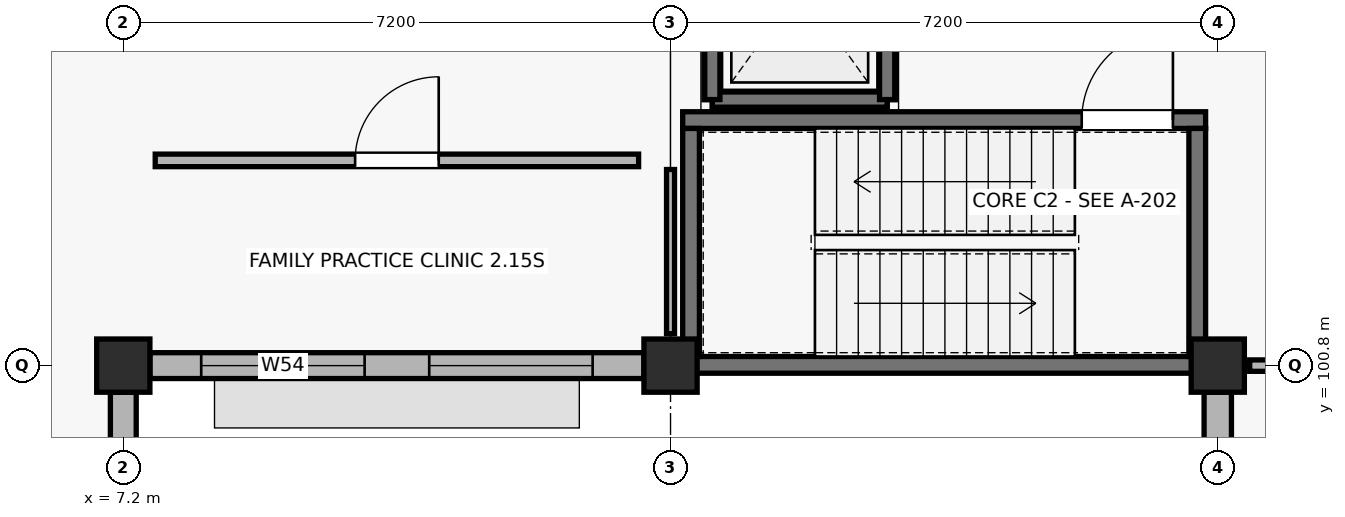
"""IFC4 building model, lengths in metres.
Left out: names, types, materials, properties, quantities, classifications, styles, units other than length and angle.
Written with IfcOpenShell. Run it as: python <this file> out.ifc"""

import sys

from ifc_helpers import new_model, si_unit, direction, frame, frame_2d, origin, origin_2d, place, context, subcontext, project, spatial, rectangle, extrude, element, fill, save


model = new_model("IFC4")
c1 = context("Model", 3, precision=1e-05, world=origin(), true_north=direction((0.0, 1.0)))
c2 = subcontext(c1, "Body", "Model", "MODEL_VIEW")
j1 = project(units=[si_unit("LENGTHUNIT", "METRE"), si_unit("PLANEANGLEUNIT", "RADIAN")], contexts=[c1])
p1 = place(None, origin())
s1 = spatial("IfcSite", under=j1, at=p1, CompositionType="ELEMENT")
p2 = place(p1, origin())
s2 = spatial("IfcBuilding", under=s1, at=p2, CompositionType="ELEMENT")
p3 = place(p2, origin())
s3 = spatial("IfcBuildingStorey", under=s2, at=p3, CompositionType="ELEMENT", Elevation=0.0)
for number, where, z_axis, x_axis in (
    (1, (7.2, 100.8, -0.25), (0.0, 0.0, 1.0), (1.0, 0.0, 0.0)),
    (2, (14.4, 100.8, -0.25), (0.0, 0.0, 1.0), (1.0, 0.0, 0.0)),
    (3, (21.6, 100.8, -0.25), (0.0, 0.0, 1.0), (1.0, 0.0, 0.0)),
):
    element("IfcColumn", number, at=place(p3, frame(where, z_axis=z_axis, x_axis=x_axis)), inside=s3, PredefinedType="COLUMN", context=c2, shape_type="SweptSolid", body=[
        extrude(rectangle(XDim=0.7, YDim=0.7, at=origin_2d()), origin(), (0.0, 0.0, 1.0), 4.75),
    ])
p4 = place(p3, frame((7.2, 93.95, 0.0), z_axis=(0.0, 0.0, 1.0), x_axis=(0.0, 1.0, 0.0)))
e4 = element("IfcWall", 4, at=p4, inside=s3, PredefinedType="SOLIDWALL", context=c2, shape_type="SweptSolid", body=[
    extrude(rectangle(XDim=6.5, YDim=0.34, at=frame_2d((3.25, 0.0))), origin(), (0.0, 0.0, 1.0), 3.52),
])
p5 = place(p3, frame((7.55, 100.8, 0.0), z_axis=(0.0, 0.0, 1.0), x_axis=(1.0, 0.0, 0.0)))
e5 = element("IfcWall", 5, at=p5, inside=s3, PredefinedType="SOLIDWALL", context=c2, shape_type="SweptSolid", body=[
    extrude(rectangle(XDim=6.5, YDim=0.34, at=frame_2d((3.25, 0.0))), origin(), (0.0, 0.0, 1.0), 3.47),
])
p6 = place(p5, frame((0.675, 0.0, 0.9)))
e6 = element("IfcOpeningElement", 6, at=p6, cuts=e5, PredefinedType="OPENING", context=c2, shape_type="SweptSolid", body=[
    extrude(rectangle(XDim=2.15, YDim=1.88, at=frame_2d((1.075, 0.94))), frame((0.0, 0.18, 0.0), z_axis=(0.0, -1.0, 0.0), x_axis=(1.0, 0.0, 0.0)), (0.0, 0.0, 1.0), 0.36),
])
p7 = place(p5, frame((3.675, 0.0, 0.9)))
e7 = element("IfcOpeningElement", 7, at=p7, cuts=e5, PredefinedType="OPENING", context=c2, shape_type="SweptSolid", body=[
    extrude(rectangle(XDim=2.15, YDim=1.88, at=frame_2d((1.075, 0.94))), frame((0.0, 0.18, 0.0), z_axis=(0.0, -1.0, 0.0), x_axis=(1.0, 0.0, 0.0)), (0.0, 0.0, 1.0), 0.36),
])
p8 = place(p3, frame((21.6, 100.45, 0.0), z_axis=(0.0, 0.0, 1.0), x_axis=(0.0, -1.0, 0.0)))
e8 = element("IfcWall", 8, at=p8, inside=s3, PredefinedType="SOLIDWALL", context=c2, shape_type="SweptSolid", body=[
    extrude(rectangle(XDim=6.525, YDim=0.36, at=frame_2d((3.262, 0.0))), origin(), (0.0, 0.0, 1.0), 3.52),
])
p9 = place(p8, frame((1.15, 0.0, 0.9)))
e9 = element("IfcOpeningElement", 9, at=p9, cuts=e8, PredefinedType="OPENING", context=c2, shape_type="SweptSolid", body=[
    extrude(rectangle(XDim=1.2, YDim=1.5, at=frame_2d((0.6, 0.75))), frame((0.0, 0.19, 0.0), z_axis=(0.0, -1.0, 0.0), x_axis=(1.0, 0.0, 0.0)), (0.0, 0.0, 1.0), 0.38),
])
p10 = place(p8, frame((4.175, 0.0, 0.9)))
e10 = element("IfcOpeningElement", 10, at=p10, cuts=e8, PredefinedType="OPENING", context=c2, shape_type="SweptSolid", body=[
    extrude(rectangle(XDim=1.2, YDim=1.5, at=frame_2d((0.6, 0.75))), frame((0.0, 0.19, 0.0), z_axis=(0.0, -1.0, 0.0), x_axis=(1.0, 0.0, 0.0)), (0.0, 0.0, 1.0), 0.38),
])
p11 = place(p3, frame((14.95, 104.3, -0.95), z_axis=(0.0, 0.0, 1.0), x_axis=(1.0, 0.0, 0.0)))
e11 = element("IfcWall", 11, at=p11, inside=s3, PredefinedType="SHEAR", context=c2, shape_type="SweptSolid", body=[
    extrude(rectangle(XDim=2.3, YDim=0.22, at=frame_2d((1.15, 0.0))), origin(), (0.0, 0.0, 1.0), 0.95),
])
for number, where, z_axis, x_axis in (
    (12, (17.25, 104.3, -0.95), (0.0, 0.0, 1.0), (0.0, 1.0, 0.0)),
    (13, (14.95, 107.25, -0.95), (0.0, 0.0, 1.0), (0.0, -1.0, 0.0)),
):
    element("IfcWall", number, at=place(p3, frame(where, z_axis=z_axis, x_axis=x_axis)), inside=s3, PredefinedType="SHEAR", context=c2, shape_type="SweptSolid", body=[
        extrude(rectangle(XDim=2.95, YDim=0.22, at=frame_2d((1.475, 0.0))), origin(), (0.0, 0.0, 1.0), 0.95),
    ])
p12 = place(p3, frame((14.56, 100.81, -0.25), z_axis=(0.0, 0.0, 1.0), x_axis=(1.0, 0.0, 0.0)))
e14 = element("IfcWall", 14, at=p12, inside=s3, PredefinedType="SHEAR", context=c2, shape_type="SweptSolid", body=[
    extrude(rectangle(XDim=6.88, YDim=0.22, at=frame_2d((3.44, 0.0))), origin(), (0.0, 0.0, 1.0), 4.47),
])
p13 = place(p3, frame((14.56, 104.03, -0.25), z_axis=(0.0, 0.0, 1.0), x_axis=(1.0, 0.0, 0.0)))
e15 = element("IfcWall", 15, at=p13, inside=s3, PredefinedType="SHEAR", context=c2, shape_type="SweptSolid", body=[
    extrude(rectangle(XDim=6.88, YDim=0.22, at=frame_2d((3.44, 0.0))), origin(), (0.0, 0.0, 1.0), 4.47),
])
p14 = place(p13, frame((5.25, 0.0, 0.25)))
e16 = element("IfcOpeningElement", 16, at=p14, cuts=e15, PredefinedType="OPENING", context=c2, shape_type="SweptSolid", body=[
    extrude(rectangle(XDim=1.2, YDim=2.15, at=frame_2d((0.6, 1.075))), frame((0.0, 0.12, 0.0), z_axis=(0.0, -1.0, 0.0), x_axis=(1.0, 0.0, 0.0)), (0.0, 0.0, 1.0), 0.24),
])
for number, where, z_axis, x_axis in (
    (17, (14.67, 100.92, -0.25), (0.0, 0.0, 1.0), (0.0, 1.0, 0.0)),
    (18, (21.33, 100.92, -0.25), (0.0, 0.0, 1.0), (0.0, 1.0, 0.0)),
):
    element("IfcWall", number, at=place(p3, frame(where, z_axis=z_axis, x_axis=x_axis)), inside=s3, PredefinedType="SHEAR", context=c2, shape_type="SweptSolid", body=[
        extrude(rectangle(XDim=3.0, YDim=0.22, at=frame_2d((1.5, 0.0))), origin(), (0.0, 0.0, 1.0), 4.47),
    ])
p15 = place(p3, frame((14.95, 104.3, 0.0), z_axis=(0.0, 0.0, 1.0), x_axis=(1.0, 0.0, 0.0)))
e19 = element("IfcWall", 19, at=p15, inside=s3, PredefinedType="SHEAR", context=c2, shape_type="SweptSolid", body=[
    extrude(rectangle(XDim=2.3, YDim=0.2, at=frame_2d((1.15, 0.0))), origin(), (0.0, 0.0, 1.0), 4.22),
])
p16 = place(p3, frame((14.95, 104.3, 0.0), z_axis=(0.0, 0.0, 1.0), x_axis=(0.0, 1.0, 0.0)))
e20 = element("IfcWall", 20, at=p16, inside=s3, PredefinedType="SHEAR", context=c2, shape_type="SweptSolid", body=[
    extrude(rectangle(XDim=2.95, YDim=0.2, at=frame_2d((1.475, 0.0))), origin(), (0.0, 0.0, 1.0), 4.22),
])
p17 = place(p3, frame((17.25, 104.3, 0.0), z_axis=(0.0, 0.0, 1.0), x_axis=(0.0, 1.0, 0.0)))
e21 = element("IfcWall", 21, at=p17, inside=s3, PredefinedType="SHEAR", context=c2, shape_type="SweptSolid", body=[
    extrude(rectangle(XDim=2.95, YDim=0.2, at=frame_2d((1.475, 0.0))), origin(), (0.0, 0.0, 1.0), 4.22),
])
p18 = place(p17, frame((0.825, 0.0, 0.0)))
e22 = element("IfcOpeningElement", 22, at=p18, cuts=e21, PredefinedType="OPENING", context=c2, shape_type="SweptSolid", body=[
    extrude(rectangle(XDim=1.3, YDim=2.15, at=frame_2d((0.65, 1.075))), frame((0.0, 0.11, 0.0), z_axis=(0.0, -1.0, 0.0), x_axis=(1.0, 0.0, 0.0)), (0.0, 0.0, 1.0), 0.22),
])
p19 = place(p3, frame((7.62, 103.5, 0.0), z_axis=(0.0, 0.0, 1.0), x_axis=(1.0, 0.0, 0.0)))
e23 = element("IfcWall", 23, at=p19, inside=s3, PredefinedType="PARTITIONING", context=c2, shape_type="SweptSolid", body=[
    extrude(rectangle(XDim=6.36, YDim=0.165, at=frame_2d((3.18, 0.0))), origin(), (0.0, 0.0, 1.0), 3.36),
])
p20 = place(p19, frame((2.63, 0.0, 0.0)))
e24 = element("IfcOpeningElement", 24, at=p20, cuts=e23, PredefinedType="OPENING", context=c2, shape_type="SweptSolid", body=[
    extrude(rectangle(XDim=1.1, YDim=2.09, at=frame_2d((0.55, 1.045))), frame((0.0, 0.093, 0.0), z_axis=(0.0, -1.0, 0.0), x_axis=(1.0, 0.0, 0.0)), (0.0, 0.0, 1.0), 0.185),
])
p21 = place(p3, frame((14.4, 101.22, 0.0), z_axis=(0.0, 0.0, 1.0), x_axis=(0.0, 1.0, 0.0)))
e25 = element("IfcWall", 25, at=p21, inside=s3, PredefinedType="PARTITIONING", context=c2, shape_type="SweptSolid", body=[
    extrude(rectangle(XDim=2.16, YDim=0.105, at=frame_2d((1.08, 0.0))), origin(), (0.0, 0.0, 1.0), 3.36),
])
p22 = place(p3, frame((22.02, 100.8, 0.0), z_axis=(0.0, 0.0, 1.0), x_axis=(1.0, 0.0, 0.0)))
e26 = element("IfcWall", 26, at=p22, inside=s3, PredefinedType="PARTITIONING", context=c2, shape_type="SweptSolid", body=[
    extrude(rectangle(XDim=2.16, YDim=0.15, at=frame_2d((1.08, 0.0))), origin(), (0.0, 0.0, 1.0), 3.36),
])
p23 = place(p6, origin())
e27 = element("IfcWindow", 27, at=p23, inside=s3, PartitioningType="SINGLE_PANEL", PredefinedType="WINDOW", context=c2, shape_type="SweptSolid", body=[
    extrude(rectangle(XDim=2.15, YDim=1.88, at=frame_2d((1.075, 0.94))), frame((0.0, 0.03, 0.0), z_axis=(0.0, -1.0, 0.0), x_axis=(1.0, 0.0, 0.0)), (0.0, 0.0, 1.0), 0.06),
])
fill(e6, e27)
p24 = place(p7, origin())
e28 = element("IfcWindow", 28, at=p24, inside=s3, PartitioningType="SINGLE_PANEL", PredefinedType="WINDOW", context=c2, shape_type="SweptSolid", body=[
    extrude(rectangle(XDim=2.15, YDim=1.88, at=frame_2d((1.075, 0.94))), frame((0.0, 0.03, 0.0), z_axis=(0.0, -1.0, 0.0), x_axis=(1.0, 0.0, 0.0)), (0.0, 0.0, 1.0), 0.06),
])
fill(e7, e28)
p25 = place(p14, origin())
e29 = element("IfcDoor", 29, at=p25, inside=s3, OperationType="SINGLE_SWING_RIGHT", PredefinedType="DOOR", context=c2, shape_type="SweptSolid", body=[
    extrude(rectangle(XDim=1.2, YDim=2.15, at=frame_2d((0.6, 1.075))), frame((0.0, 0.025, 0.0), z_axis=(0.0, -1.0, 0.0), x_axis=(1.0, 0.0, 0.0)), (0.0, 0.0, 1.0), 0.05),
])
fill(e16, e29)
p26 = place(p20, origin())
e30 = element("IfcDoor", 30, at=p26, inside=s3, OperationType="SINGLE_SWING_RIGHT", PredefinedType="DOOR", context=c2, shape_type="SweptSolid", body=[
    extrude(rectangle(XDim=1.1, YDim=2.09, at=frame_2d((0.55, 1.045))), frame((0.0, 0.025, 0.0), z_axis=(0.0, -1.0, 0.0), x_axis=(1.0, 0.0, 0.0)), (0.0, 0.0, 1.0), 0.05),
])
fill(e24, e30)
save(model, sys.argv[1])
